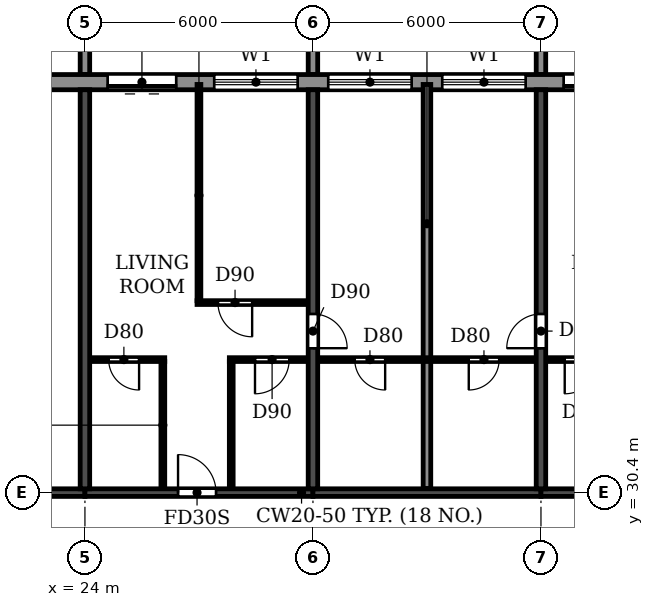
"""IFC4 building model, lengths in metres.
Left out: names, types, materials, properties, quantities, classifications, styles, units other than length and angle.
Written with IfcOpenShell. Run it as: python <this file> out.ifc"""

import sys

from ifc_helpers import new_model, si_unit, direction, frame, frame_2d, origin, place, context, subcontext, project, spatial, polyline, rectangle, outline, extrude, source, transform, mapped, element, fill, save


model = new_model("IFC4")
c1 = context("Model", 3, precision=1e-05, world=origin(), true_north=direction((0.0, 1.0)))
c2 = subcontext(c1, "Body", "Model", "MODEL_VIEW")
j1 = project(units=[si_unit("LENGTHUNIT", "METRE"), si_unit("PLANEANGLEUNIT", "RADIAN")], contexts=[c1])
p1 = place(None, origin())
s1 = spatial("IfcSite", under=j1, at=p1, CompositionType="ELEMENT")
p2 = place(p1, origin())
s2 = spatial("IfcBuilding", under=s1, at=p2, CompositionType="ELEMENT")
p3 = place(p2, frame((0.0, 0.0, 241.2)))
s3 = spatial("IfcBuildingStorey", under=s2, at=p3, CompositionType="ELEMENT", Elevation=241.2)
p4 = place(p3, frame((24.0, 30.5, 0.0), z_axis=(0.0, 0.0, 1.0), x_axis=(0.0, 1.0, 0.0)))
e1 = element("IfcWall", 1, at=p4, inside=s3, PredefinedType="SHEAR", context=c2, shape_type="SweptSolid", body=[
    extrude(rectangle(XDim=10.5, YDim=0.25, at=frame_2d((5.25, 0.0))), origin(), (0.0, 0.0, 1.0), 3.08),
])
p5 = place(p3, frame((30.0, 30.5, 0.0), z_axis=(0.0, 0.0, 1.0), x_axis=(0.0, 1.0, 0.0)))
e2 = element("IfcWall", 2, at=p5, inside=s3, PredefinedType="SHEAR", context=c2, shape_type="SweptSolid", body=[
    extrude(rectangle(XDim=10.5, YDim=0.25, at=frame_2d((5.25, 0.0))), origin(), (0.0, 0.0, 1.0), 3.08),
])
p6 = place(p5, frame((3.7, 0.0, 0.0)))
e3 = element("IfcOpeningElement", 3, at=p6, cuts=e2, PredefinedType="OPENING", context=c2, shape_type="SweptSolid", body=[
    extrude(rectangle(XDim=0.9, YDim=2.1, at=frame_2d((0.45, 1.05))), frame((0.0, 0.135, 0.0), z_axis=(0.0, -1.0, 0.0), x_axis=(1.0, 0.0, 0.0)), (0.0, 0.0, 1.0), 0.27),
])
p7 = place(p3, frame((36.0, 30.5, 0.0), z_axis=(0.0, 0.0, 1.0), x_axis=(0.0, 1.0, 0.0)))
e4 = element("IfcWall", 4, at=p7, inside=s3, PredefinedType="SHEAR", context=c2, shape_type="SweptSolid", body=[
    extrude(rectangle(XDim=10.5, YDim=0.25, at=frame_2d((5.25, 0.0))), origin(), (0.0, 0.0, 1.0), 3.08),
])
p8 = place(p7, frame((3.7, 0.0, 0.0)))
e5 = element("IfcOpeningElement", 5, at=p8, cuts=e4, PredefinedType="OPENING", context=c2, shape_type="SweptSolid", body=[
    extrude(rectangle(XDim=0.9, YDim=2.1, at=frame_2d((0.45, 1.05))), frame((0.0, 0.135, 0.0), z_axis=(0.0, -1.0, 0.0), x_axis=(1.0, 0.0, 0.0)), (0.0, 0.0, 1.0), 0.27),
])
p9 = place(p3, frame((18.2, 30.4, 0.0), z_axis=(0.0, 0.0, 1.0), x_axis=(1.0, 0.0, 0.0)))
e6 = element("IfcWall", 6, at=p9, inside=s3, PredefinedType="SHEAR", context=c2, shape_type="SweptSolid", body=[
    extrude(rectangle(XDim=5.8, YDim=0.2, at=frame_2d((2.9, 0.0))), origin(), (0.0, 0.0, 1.0), 2.48),
])
p10 = place(p9, frame((2.3, 0.0, 0.0)))
e7 = element("IfcOpeningElement", 7, at=p10, cuts=e6, PredefinedType="OPENING", context=c2, shape_type="SweptSolid", body=[
    extrude(rectangle(XDim=1.0, YDim=2.1, at=frame_2d((0.5, 1.05))), frame((0.0, 0.11, 0.0), z_axis=(0.0, -1.0, 0.0), x_axis=(1.0, 0.0, 0.0)), (0.0, 0.0, 1.0), 0.22),
])
p11 = place(p3, frame((24.0, 30.4, 0.0), z_axis=(0.0, 0.0, 1.0), x_axis=(1.0, 0.0, 0.0)))
e8 = element("IfcWall", 8, at=p11, inside=s3, PredefinedType="SHEAR", context=c2, shape_type="SweptSolid", body=[
    extrude(rectangle(XDim=6.0, YDim=0.2, at=frame_2d((3.0, 0.0))), origin(), (0.0, 0.0, 1.0), 2.48),
])
p12 = place(p11, frame((2.45, 0.0, 0.0)))
e9 = element("IfcOpeningElement", 9, at=p12, cuts=e8, PredefinedType="OPENING", context=c2, shape_type="SweptSolid", body=[
    extrude(rectangle(XDim=1.0, YDim=2.1, at=frame_2d((0.5, 1.05))), frame((0.0, 0.11, 0.0), z_axis=(0.0, -1.0, 0.0), x_axis=(1.0, 0.0, 0.0)), (0.0, 0.0, 1.0), 0.22),
])
p13 = place(p3, frame((30.0, 30.4, 0.0), z_axis=(0.0, 0.0, 1.0), x_axis=(1.0, 0.0, 0.0)))
e10 = element("IfcWall", 10, at=p13, inside=s3, PredefinedType="SHEAR", context=c2, shape_type="SweptSolid", body=[
    extrude(rectangle(XDim=6.0, YDim=0.2, at=frame_2d((3.0, 0.0))), origin(), (0.0, 0.0, 1.0), 2.48),
])
p14 = place(p3, frame((36.0, 30.4, 0.0), z_axis=(0.0, 0.0, 1.0), x_axis=(1.0, 0.0, 0.0)))
e11 = element("IfcWall", 11, at=p14, inside=s3, PredefinedType="SHEAR", context=c2, shape_type="SweptSolid", body=[
    extrude(rectangle(XDim=6.0, YDim=0.2, at=frame_2d((3.0, 0.0))), origin(), (0.0, 0.0, 1.0), 2.48),
])
p15 = place(p14, frame((2.55, 0.0, 0.0)))
e12 = element("IfcOpeningElement", 12, at=p15, cuts=e11, PredefinedType="OPENING", context=c2, shape_type="SweptSolid", body=[
    extrude(rectangle(XDim=1.0, YDim=2.1, at=frame_2d((0.5, 1.05))), frame((0.0, 0.11, 0.0), z_axis=(0.0, -1.0, 0.0), x_axis=(1.0, 0.0, 0.0)), (0.0, 0.0, 1.0), 0.22),
])
p16 = place(p3, frame((79.317, 41.2, 0.0), z_axis=(0.0, 0.0, 1.0), x_axis=(-1.0, 0.0, 0.0)))
e13 = element("IfcWall", 13, at=p16, inside=s3, PredefinedType="STANDARD", context=c2, shape_type="SweptSolid", body=[
    extrude(rectangle(XDim=56.634, YDim=0.4, at=frame_2d((28.317, 0.0))), origin(), (0.0, 0.0, 1.0), 3.08),
])
p17 = place(p16, frame((52.917, 0.0, 0.0)))
e14 = element("IfcOpeningElement", 14, at=p17, cuts=e13, PredefinedType="OPENING", context=c2, shape_type="SweptSolid", body=[
    extrude(rectangle(XDim=1.8, YDim=2.4, at=frame_2d((0.9, 1.2))), frame((0.0, 0.21, 0.0), z_axis=(0.0, -1.0, 0.0), x_axis=(1.0, 0.0, 0.0)), (0.0, 0.0, 1.0), 0.42),
])
p18 = place(p16, frame((49.717, 0.0, 0.9)))
e15 = element("IfcOpeningElement", 15, at=p18, cuts=e13, PredefinedType="OPENING", context=c2, shape_type="SweptSolid", body=[
    extrude(rectangle(XDim=2.2, YDim=1.5, at=frame_2d((1.1, 0.75))), frame((0.0, 0.21, 0.0), z_axis=(0.0, -1.0, 0.0), x_axis=(1.0, 0.0, 0.0)), (0.0, 0.0, 1.0), 0.42),
])
p19 = place(p16, frame((46.717, 0.0, 0.9)))
e16 = element("IfcOpeningElement", 16, at=p19, cuts=e13, PredefinedType="OPENING", context=c2, shape_type="SweptSolid", body=[
    extrude(rectangle(XDim=2.2, YDim=1.5, at=frame_2d((1.1, 0.75))), frame((0.0, 0.21, 0.0), z_axis=(0.0, -1.0, 0.0), x_axis=(1.0, 0.0, 0.0)), (0.0, 0.0, 1.0), 0.42),
])
p20 = place(p16, frame((43.717, 0.0, 0.9)))
e17 = element("IfcOpeningElement", 17, at=p20, cuts=e13, PredefinedType="OPENING", context=c2, shape_type="SweptSolid", body=[
    extrude(rectangle(XDim=2.2, YDim=1.5, at=frame_2d((1.1, 0.75))), frame((0.0, 0.21, 0.0), z_axis=(0.0, -1.0, 0.0), x_axis=(1.0, 0.0, 0.0)), (0.0, 0.0, 1.0), 0.42),
])
p21 = place(p16, frame((40.917, 0.0, 0.0)))
e18 = element("IfcOpeningElement", 18, at=p21, cuts=e13, PredefinedType="OPENING", context=c2, shape_type="SweptSolid", body=[
    extrude(rectangle(XDim=1.8, YDim=2.4, at=frame_2d((0.9, 1.2))), frame((0.0, 0.21, 0.0), z_axis=(0.0, -1.0, 0.0), x_axis=(1.0, 0.0, 0.0)), (0.0, 0.0, 1.0), 0.42),
])
p22 = place(p16, frame((37.717, 0.0, 0.9)))
e19 = element("IfcOpeningElement", 19, at=p22, cuts=e13, PredefinedType="OPENING", context=c2, shape_type="SweptSolid", body=[
    extrude(rectangle(XDim=2.2, YDim=1.5, at=frame_2d((1.1, 0.75))), frame((0.0, 0.21, 0.0), z_axis=(0.0, -1.0, 0.0), x_axis=(1.0, 0.0, 0.0)), (0.0, 0.0, 1.0), 0.42),
])
p23 = place(p16, frame((34.717, 0.0, 0.9)))
e20 = element("IfcOpeningElement", 20, at=p23, cuts=e13, PredefinedType="OPENING", context=c2, shape_type="SweptSolid", body=[
    extrude(rectangle(XDim=2.2, YDim=1.5, at=frame_2d((1.1, 0.75))), frame((0.0, 0.21, 0.0), z_axis=(0.0, -1.0, 0.0), x_axis=(1.0, 0.0, 0.0)), (0.0, 0.0, 1.0), 0.42),
])
p24 = place(p16, frame((31.717, 0.0, 0.9)))
e21 = element("IfcOpeningElement", 21, at=p24, cuts=e13, PredefinedType="OPENING", context=c2, shape_type="SweptSolid", body=[
    extrude(rectangle(XDim=2.2, YDim=1.5, at=frame_2d((1.1, 0.75))), frame((0.0, 0.21, 0.0), z_axis=(0.0, -1.0, 0.0), x_axis=(1.0, 0.0, 0.0)), (0.0, 0.0, 1.0), 0.42),
])
p25 = place(p16, frame((28.717, 0.0, 0.9)))
e22 = element("IfcOpeningElement", 22, at=p25, cuts=e13, PredefinedType="OPENING", context=c2, shape_type="SweptSolid", body=[
    extrude(rectangle(XDim=2.2, YDim=1.5, at=frame_2d((1.1, 0.75))), frame((0.0, 0.21, 0.0), z_axis=(0.0, -1.0, 0.0), x_axis=(1.0, 0.0, 0.0)), (0.0, 0.0, 1.0), 0.42),
])
p26 = place(p16, frame((25.917, 0.0, 0.0)))
e23 = element("IfcOpeningElement", 23, at=p26, cuts=e13, PredefinedType="OPENING", context=c2, shape_type="SweptSolid", body=[
    extrude(rectangle(XDim=1.8, YDim=2.4, at=frame_2d((0.9, 1.2))), frame((0.0, 0.21, 0.0), z_axis=(0.0, -1.0, 0.0), x_axis=(1.0, 0.0, 0.0)), (0.0, 0.0, 1.0), 0.42),
])
p27 = place(p16, frame((22.717, 0.0, 0.9)))
e24 = element("IfcOpeningElement", 24, at=p27, cuts=e13, PredefinedType="OPENING", context=c2, shape_type="SweptSolid", body=[
    extrude(rectangle(XDim=2.2, YDim=1.5, at=frame_2d((1.1, 0.75))), frame((0.0, 0.21, 0.0), z_axis=(0.0, -1.0, 0.0), x_axis=(1.0, 0.0, 0.0)), (0.0, 0.0, 1.0), 0.42),
])
p28 = place(p16, frame((19.717, 0.0, 0.9)))
e25 = element("IfcOpeningElement", 25, at=p28, cuts=e13, PredefinedType="OPENING", context=c2, shape_type="SweptSolid", body=[
    extrude(rectangle(XDim=2.2, YDim=1.5, at=frame_2d((1.1, 0.75))), frame((0.0, 0.21, 0.0), z_axis=(0.0, -1.0, 0.0), x_axis=(1.0, 0.0, 0.0)), (0.0, 0.0, 1.0), 0.42),
])
p29 = place(p16, frame((16.717, 0.0, 0.9)))
e26 = element("IfcOpeningElement", 26, at=p29, cuts=e13, PredefinedType="OPENING", context=c2, shape_type="SweptSolid", body=[
    extrude(rectangle(XDim=2.2, YDim=1.5, at=frame_2d((1.1, 0.75))), frame((0.0, 0.21, 0.0), z_axis=(0.0, -1.0, 0.0), x_axis=(1.0, 0.0, 0.0)), (0.0, 0.0, 1.0), 0.42),
])
p30 = place(p16, frame((13.917, 0.0, 0.0)))
e27 = element("IfcOpeningElement", 27, at=p30, cuts=e13, PredefinedType="OPENING", context=c2, shape_type="SweptSolid", body=[
    extrude(rectangle(XDim=1.8, YDim=2.4, at=frame_2d((0.9, 1.2))), frame((0.0, 0.21, 0.0), z_axis=(0.0, -1.0, 0.0), x_axis=(1.0, 0.0, 0.0)), (0.0, 0.0, 1.0), 0.42),
])
p31 = place(p16, frame((10.717, 0.0, 0.9)))
e28 = element("IfcOpeningElement", 28, at=p31, cuts=e13, PredefinedType="OPENING", context=c2, shape_type="SweptSolid", body=[
    extrude(rectangle(XDim=2.2, YDim=1.5, at=frame_2d((1.1, 0.75))), frame((0.0, 0.21, 0.0), z_axis=(0.0, -1.0, 0.0), x_axis=(1.0, 0.0, 0.0)), (0.0, 0.0, 1.0), 0.42),
])
p32 = place(p16, frame((7.917, 0.0, 0.0)))
e29 = element("IfcOpeningElement", 29, at=p32, cuts=e13, PredefinedType="OPENING", context=c2, shape_type="SweptSolid", body=[
    extrude(rectangle(XDim=1.8, YDim=2.4, at=frame_2d((0.9, 1.2))), frame((0.0, 0.21, 0.0), z_axis=(0.0, -1.0, 0.0), x_axis=(1.0, 0.0, 0.0)), (0.0, 0.0, 1.0), 0.42),
])
p33 = place(p16, frame((4.717, 0.0, 0.9)))
e30 = element("IfcOpeningElement", 30, at=p33, cuts=e13, PredefinedType="OPENING", context=c2, shape_type="SweptSolid", body=[
    extrude(rectangle(XDim=2.2, YDim=1.5, at=frame_2d((1.1, 0.75))), frame((0.0, 0.21, 0.0), z_axis=(0.0, -1.0, 0.0), x_axis=(1.0, 0.0, 0.0)), (0.0, 0.0, 1.0), 0.42),
])
p34 = place(p16, frame((1.917, 0.0, 0.0)))
e31 = element("IfcOpeningElement", 31, at=p34, cuts=e13, PredefinedType="OPENING", context=c2, shape_type="SweptSolid", body=[
    extrude(rectangle(XDim=1.8, YDim=2.4, at=frame_2d((0.9, 1.2))), frame((0.0, 0.21, 0.0), z_axis=(0.0, -1.0, 0.0), x_axis=(1.0, 0.0, 0.0)), (0.0, 0.0, 1.0), 0.42),
])
m1 = source(origin(), c2, "Body", "SweptSolid", [
    extrude(outline(polyline([(0.0, 0.0), (0.25, 0.0), (0.25, 3.1), (0.0, 3.1), (0.0, 0.0)])), origin(), (0.0, 0.0, 1.0), 3.1),
])
for number, where in (
    (32, (23.875, 41.4, 0.0)),
    (33, (29.875, 41.4, 0.0)),
    (34, (35.875, 41.4, 0.0)),
):
    element("IfcWall", number, at=place(p3, frame(where)), inside=s3, PredefinedType="STANDARD", context=c2, shape_type="MappedRepresentation", body=[
        mapped(m1, transform((0.0, 0.0, 0.0))),
    ])
p35 = place(p3, frame((33.0, 30.51, 0.0), z_axis=(0.0, 0.0, 1.0), x_axis=(0.0, 1.0, 0.0)))
e35 = element("IfcWall", 35, at=p35, inside=s3, PredefinedType="PARTITIONING", context=c2, shape_type="SweptSolid", body=[
    extrude(rectangle(XDim=10.63, YDim=0.2, at=frame_2d((5.315, 0.0))), origin(), (0.0, 0.0, 1.0), 3.08),
])
p36 = place(p3, frame((24.135, 33.9, 0.0), z_axis=(0.0, 0.0, 1.0), x_axis=(1.0, 0.0, 0.0)))
e36 = element("IfcWall", 36, at=p36, inside=s3, PredefinedType="PARTITIONING", context=c2, shape_type="SweptSolid", body=[
    extrude(rectangle(XDim=1.965, YDim=0.1, at=frame_2d((0.982, 0.0))), origin(), (0.0, 0.0, 1.0), 3.08),
])
p37 = place(p36, frame((0.49, 0.0, 0.0)))
e37 = element("IfcOpeningElement", 37, at=p37, cuts=e36, PredefinedType="OPENING", context=c2, shape_type="SweptSolid", body=[
    extrude(rectangle(XDim=0.8, YDim=2.1, at=frame_2d((0.4, 1.05))), frame((0.0, 0.06, 0.0), z_axis=(0.0, -1.0, 0.0), x_axis=(1.0, 0.0, 0.0)), (0.0, 0.0, 1.0), 0.12),
])
p38 = place(p3, frame((27.8, 33.9, 0.0), z_axis=(0.0, 0.0, 1.0), x_axis=(1.0, 0.0, 0.0)))
e38 = element("IfcWall", 38, at=p38, inside=s3, PredefinedType="PARTITIONING", context=c2, shape_type="SweptSolid", body=[
    extrude(rectangle(XDim=2.065, YDim=0.1, at=frame_2d((1.032, 0.0))), origin(), (0.0, 0.0, 1.0), 3.08),
])
p39 = place(p38, frame((0.675, 0.0, 0.0)))
e39 = element("IfcOpeningElement", 39, at=p39, cuts=e38, PredefinedType="OPENING", context=c2, shape_type="SweptSolid", body=[
    extrude(rectangle(XDim=0.9, YDim=2.1, at=frame_2d((0.45, 1.05))), frame((0.0, 0.06, 0.0), z_axis=(0.0, -1.0, 0.0), x_axis=(1.0, 0.0, 0.0)), (0.0, 0.0, 1.0), 0.12),
])
p40 = place(p3, frame((30.135, 33.9, 0.0), z_axis=(0.0, 0.0, 1.0), x_axis=(1.0, 0.0, 0.0)))
e40 = element("IfcWall", 40, at=p40, inside=s3, PredefinedType="PARTITIONING", context=c2, shape_type="SweptSolid", body=[
    extrude(rectangle(XDim=5.73, YDim=0.1, at=frame_2d((2.865, 0.0))), origin(), (0.0, 0.0, 1.0), 3.08),
])
p41 = place(p40, frame((0.965, 0.0, 0.0)))
e41 = element("IfcOpeningElement", 41, at=p41, cuts=e40, PredefinedType="OPENING", context=c2, shape_type="SweptSolid", body=[
    extrude(rectangle(XDim=0.8, YDim=2.1, at=frame_2d((0.4, 1.05))), frame((0.0, 0.06, 0.0), z_axis=(0.0, -1.0, 0.0), x_axis=(1.0, 0.0, 0.0)), (0.0, 0.0, 1.0), 0.12),
])
p42 = place(p40, frame((3.965, 0.0, 0.0)))
e42 = element("IfcOpeningElement", 42, at=p42, cuts=e40, PredefinedType="OPENING", context=c2, shape_type="SweptSolid", body=[
    extrude(rectangle(XDim=0.8, YDim=2.1, at=frame_2d((0.4, 1.05))), frame((0.0, 0.06, 0.0), z_axis=(0.0, -1.0, 0.0), x_axis=(1.0, 0.0, 0.0)), (0.0, 0.0, 1.0), 0.12),
])
p43 = place(p3, frame((36.135, 33.9, 0.0), z_axis=(0.0, 0.0, 1.0), x_axis=(1.0, 0.0, 0.0)))
e43 = element("IfcWall", 43, at=p43, inside=s3, PredefinedType="PARTITIONING", context=c2, shape_type="SweptSolid", body=[
    extrude(rectangle(XDim=2.065, YDim=0.1, at=frame_2d((1.032, 0.0))), origin(), (0.0, 0.0, 1.0), 3.08),
])
p44 = place(p43, frame((0.49, 0.0, 0.0)))
e44 = element("IfcOpeningElement", 44, at=p44, cuts=e43, PredefinedType="OPENING", context=c2, shape_type="SweptSolid", body=[
    extrude(rectangle(XDim=0.9, YDim=2.1, at=frame_2d((0.45, 1.05))), frame((0.0, 0.06, 0.0), z_axis=(0.0, -1.0, 0.0), x_axis=(1.0, 0.0, 0.0)), (0.0, 0.0, 1.0), 0.12),
])
p45 = place(p3, frame((26.95, 35.4, 0.0), z_axis=(0.0, 0.0, 1.0), x_axis=(1.0, 0.0, 0.0)))
e45 = element("IfcWall", 45, at=p45, inside=s3, PredefinedType="PARTITIONING", context=c2, shape_type="SweptSolid", body=[
    extrude(rectangle(XDim=2.915, YDim=0.1, at=frame_2d((1.458, 0.0))), origin(), (0.0, 0.0, 1.0), 3.08),
])
p46 = place(p45, frame((0.55, 0.0, 0.0)))
e46 = element("IfcOpeningElement", 46, at=p46, cuts=e45, PredefinedType="OPENING", context=c2, shape_type="SweptSolid", body=[
    extrude(rectangle(XDim=0.9, YDim=2.1, at=frame_2d((0.45, 1.05))), frame((0.0, 0.06, 0.0), z_axis=(0.0, -1.0, 0.0), x_axis=(1.0, 0.0, 0.0)), (0.0, 0.0, 1.0), 0.12),
])
p47 = place(p3, frame((26.05, 30.51, 0.0), z_axis=(0.0, 0.0, 1.0), x_axis=(0.0, 1.0, 0.0)))
e47 = element("IfcWall", 47, at=p47, inside=s3, PredefinedType="PARTITIONING", context=c2, shape_type="SweptSolid", body=[
    extrude(rectangle(XDim=3.34, YDim=0.1, at=frame_2d((1.67, 0.0))), origin(), (0.0, 0.0, 1.0), 3.08),
])
p48 = place(p3, frame((27.0, 35.45, 0.0), z_axis=(0.0, 0.0, 1.0), x_axis=(0.0, 1.0, 0.0)))
e48 = element("IfcWall", 48, at=p48, inside=s3, PredefinedType="PARTITIONING", context=c2, shape_type="SweptSolid", body=[
    extrude(rectangle(XDim=5.69, YDim=0.1, at=frame_2d((2.845, 0.0))), origin(), (0.0, 0.0, 1.0), 3.08),
])
p49 = place(p3, frame((27.85, 30.51, 0.0), z_axis=(0.0, 0.0, 1.0), x_axis=(0.0, 1.0, 0.0)))
e49 = element("IfcWall", 49, at=p49, inside=s3, PredefinedType="PARTITIONING", context=c2, shape_type="SweptSolid", body=[
    extrude(rectangle(XDim=3.34, YDim=0.1, at=frame_2d((1.67, 0.0))), origin(), (0.0, 0.0, 1.0), 3.08),
])
p50 = place(p17, origin())
e50 = element("IfcDoor", 50, at=p50, inside=s3, OperationType="DOUBLE_DOOR_SLIDING", PredefinedType="DOOR", context=c2, shape_type="SweptSolid", body=[
    extrude(rectangle(XDim=1.8, YDim=2.4, at=frame_2d((0.9, 1.2))), frame((0.0, 0.025, 0.0), z_axis=(0.0, -1.0, 0.0), x_axis=(1.0, 0.0, 0.0)), (0.0, 0.0, 1.0), 0.05),
])
fill(e14, e50)
p51 = place(p18, origin())
e51 = element("IfcWindow", 51, at=p51, inside=s3, PartitioningType="DOUBLE_PANEL_HORIZONTAL", PredefinedType="WINDOW", context=c2, shape_type="SweptSolid", body=[
    extrude(rectangle(XDim=2.2, YDim=1.5, at=frame_2d((1.1, 0.75))), frame((0.0, 0.03, 0.0), z_axis=(0.0, -1.0, 0.0), x_axis=(1.0, 0.0, 0.0)), (0.0, 0.0, 1.0), 0.06),
])
fill(e15, e51)
p52 = place(p19, origin())
e52 = element("IfcWindow", 52, at=p52, inside=s3, PartitioningType="DOUBLE_PANEL_HORIZONTAL", PredefinedType="WINDOW", context=c2, shape_type="SweptSolid", body=[
    extrude(rectangle(XDim=2.2, YDim=1.5, at=frame_2d((1.1, 0.75))), frame((0.0, 0.03, 0.0), z_axis=(0.0, -1.0, 0.0), x_axis=(1.0, 0.0, 0.0)), (0.0, 0.0, 1.0), 0.06),
])
fill(e16, e52)
p53 = place(p20, origin())
e53 = element("IfcWindow", 53, at=p53, inside=s3, PartitioningType="DOUBLE_PANEL_HORIZONTAL", PredefinedType="WINDOW", context=c2, shape_type="SweptSolid", body=[
    extrude(rectangle(XDim=2.2, YDim=1.5, at=frame_2d((1.1, 0.75))), frame((0.0, 0.03, 0.0), z_axis=(0.0, -1.0, 0.0), x_axis=(1.0, 0.0, 0.0)), (0.0, 0.0, 1.0), 0.06),
])
fill(e17, e53)
p54 = place(p21, origin())
e54 = element("IfcDoor", 54, at=p54, inside=s3, OperationType="DOUBLE_DOOR_SLIDING", PredefinedType="DOOR", context=c2, shape_type="SweptSolid", body=[
    extrude(rectangle(XDim=1.8, YDim=2.4, at=frame_2d((0.9, 1.2))), frame((0.0, 0.025, 0.0), z_axis=(0.0, -1.0, 0.0), x_axis=(1.0, 0.0, 0.0)), (0.0, 0.0, 1.0), 0.05),
])
fill(e18, e54)
p55 = place(p41, frame((0.8, 0.0, 0.0), z_axis=(0.0, 0.0, 1.0), x_axis=(-1.0, 0.0, 0.0)))
e55 = element("IfcDoor", 55, at=p55, inside=s3, OperationType="SINGLE_SWING_LEFT", PredefinedType="DOOR", context=c2, shape_type="SweptSolid", body=[
    extrude(rectangle(XDim=0.8, YDim=2.1, at=frame_2d((0.4, 1.05))), frame((0.0, 0.025, 0.0), z_axis=(0.0, -1.0, 0.0), x_axis=(1.0, 0.0, 0.0)), (0.0, 0.0, 1.0), 0.05),
])
fill(e41, e55)
p56 = place(p37, frame((0.8, 0.0, 0.0), z_axis=(0.0, 0.0, 1.0), x_axis=(-1.0, 0.0, 0.0)))
e56 = element("IfcDoor", 56, at=p56, inside=s3, OperationType="SINGLE_SWING_LEFT", PredefinedType="DOOR", context=c2, shape_type="SweptSolid", body=[
    extrude(rectangle(XDim=0.8, YDim=2.1, at=frame_2d((0.4, 1.05))), frame((0.0, 0.025, 0.0), z_axis=(0.0, -1.0, 0.0), x_axis=(1.0, 0.0, 0.0)), (0.0, 0.0, 1.0), 0.05),
])
fill(e37, e56)
p57 = place(p12, origin())
e57 = element("IfcDoor", 57, at=p57, inside=s3, OperationType="SINGLE_SWING_LEFT", PredefinedType="DOOR", context=c2, shape_type="SweptSolid", body=[
    extrude(rectangle(XDim=1.0, YDim=2.1, at=frame_2d((0.5, 1.05))), frame((0.0, 0.025, 0.0), z_axis=(0.0, -1.0, 0.0), x_axis=(1.0, 0.0, 0.0)), (0.0, 0.0, 1.0), 0.05),
])
fill(e9, e57)
p58 = place(p46, frame((0.9, 0.0, 0.0), z_axis=(0.0, 0.0, 1.0), x_axis=(-1.0, 0.0, 0.0)))
e58 = element("IfcDoor", 58, at=p58, inside=s3, OperationType="SINGLE_SWING_LEFT", PredefinedType="DOOR", context=c2, shape_type="SweptSolid", body=[
    extrude(rectangle(XDim=0.9, YDim=2.1, at=frame_2d((0.45, 1.05))), frame((0.0, 0.025, 0.0), z_axis=(0.0, -1.0, 0.0), x_axis=(1.0, 0.0, 0.0)), (0.0, 0.0, 1.0), 0.05),
])
fill(e46, e58)
p59 = place(p39, frame((0.9, 0.0, 0.0), z_axis=(0.0, 0.0, 1.0), x_axis=(-1.0, 0.0, 0.0)))
e59 = element("IfcDoor", 59, at=p59, inside=s3, OperationType="SINGLE_SWING_RIGHT", PredefinedType="DOOR", context=c2, shape_type="SweptSolid", body=[
    extrude(rectangle(XDim=0.9, YDim=2.1, at=frame_2d((0.45, 1.05))), frame((0.0, 0.025, 0.0), z_axis=(0.0, -1.0, 0.0), x_axis=(1.0, 0.0, 0.0)), (0.0, 0.0, 1.0), 0.05),
])
fill(e39, e59)
p60 = place(p6, frame((0.9, 0.0, 0.0), z_axis=(0.0, 0.0, 1.0), x_axis=(-1.0, 0.0, 0.0)))
e60 = element("IfcDoor", 60, at=p60, inside=s3, OperationType="SINGLE_SWING_RIGHT", PredefinedType="DOOR", context=c2, shape_type="SweptSolid", body=[
    extrude(rectangle(XDim=0.9, YDim=2.1, at=frame_2d((0.45, 1.05))), frame((0.0, 0.025, 0.0), z_axis=(0.0, -1.0, 0.0), x_axis=(1.0, 0.0, 0.0)), (0.0, 0.0, 1.0), 0.05),
])
fill(e3, e60)
p61 = place(p42, frame((0.8, 0.0, 0.0), z_axis=(0.0, 0.0, 1.0), x_axis=(-1.0, 0.0, 0.0)))
e61 = element("IfcDoor", 61, at=p61, inside=s3, OperationType="SINGLE_SWING_RIGHT", PredefinedType="DOOR", context=c2, shape_type="SweptSolid", body=[
    extrude(rectangle(XDim=0.8, YDim=2.1, at=frame_2d((0.4, 1.05))), frame((0.0, 0.025, 0.0), z_axis=(0.0, -1.0, 0.0), x_axis=(1.0, 0.0, 0.0)), (0.0, 0.0, 1.0), 0.05),
])
fill(e42, e61)
p62 = place(p8, origin())
e62 = element("IfcDoor", 62, at=p62, inside=s3, OperationType="SINGLE_SWING_LEFT", PredefinedType="DOOR", context=c2, shape_type="SweptSolid", body=[
    extrude(rectangle(XDim=0.9, YDim=2.1, at=frame_2d((0.45, 1.05))), frame((0.0, 0.025, 0.0), z_axis=(0.0, -1.0, 0.0), x_axis=(1.0, 0.0, 0.0)), (0.0, 0.0, 1.0), 0.05),
])
fill(e5, e62)
p63 = place(p44, frame((0.9, 0.0, 0.0), z_axis=(0.0, 0.0, 1.0), x_axis=(-1.0, 0.0, 0.0)))
e63 = element("IfcDoor", 63, at=p63, inside=s3, OperationType="SINGLE_SWING_RIGHT", PredefinedType="DOOR", context=c2, shape_type="SweptSolid", body=[
    extrude(rectangle(XDim=0.9, YDim=2.1, at=frame_2d((0.45, 1.05))), frame((0.0, 0.025, 0.0), z_axis=(0.0, -1.0, 0.0), x_axis=(1.0, 0.0, 0.0)), (0.0, 0.0, 1.0), 0.05),
])
fill(e44, e63)
save(model, sys.argv[1])
